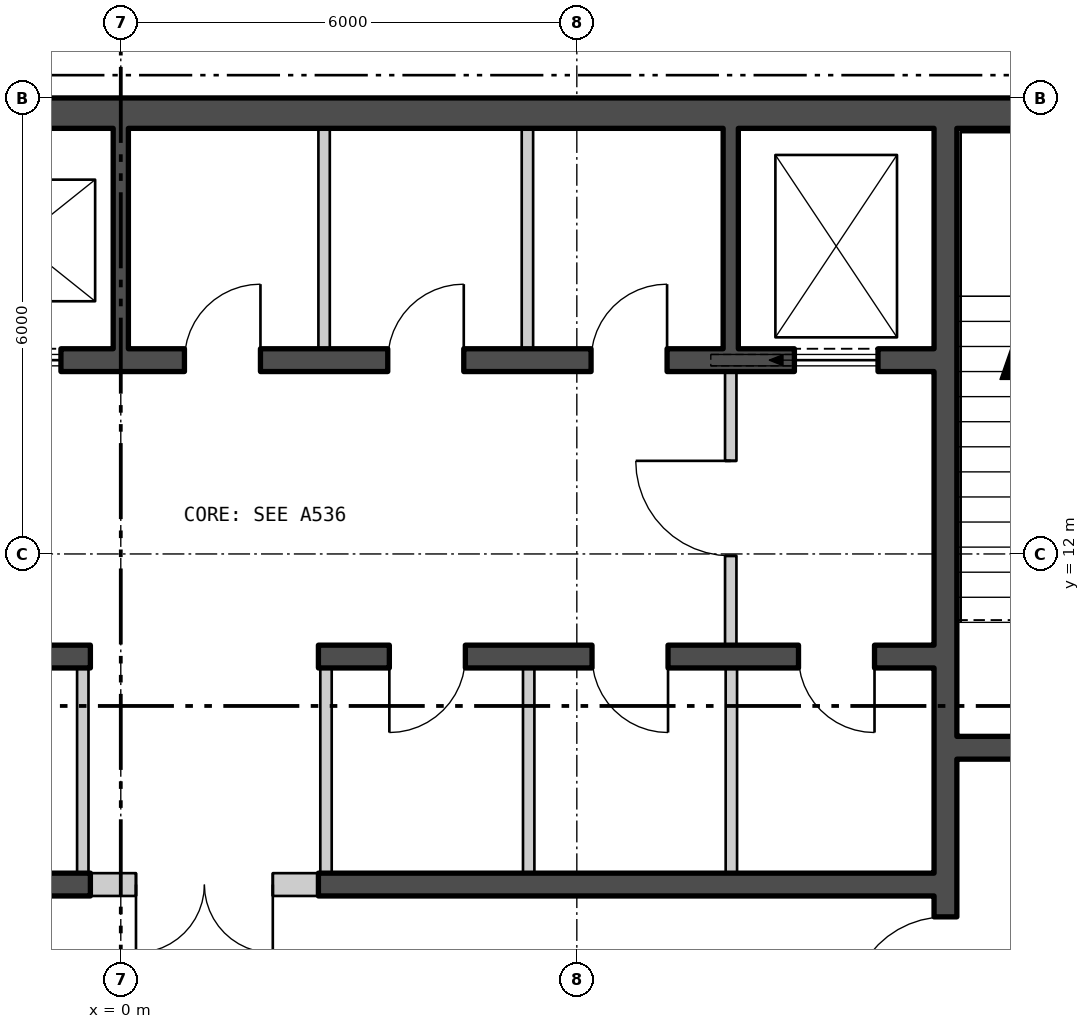
"""IFC4 building model, lengths in metres.
Left out: names, types, materials, properties, quantities, classifications, styles, units other than length and angle.
Written with IfcOpenShell. Run it as: python <this file> out.ifc"""

import sys

from ifc_helpers import new_model, si_unit, direction, frame, frame_2d, origin, place, context, subcontext, project, spatial, polyline, rectangle, outline, extrude, element, fill, save


model = new_model("IFC4")
c1 = context("Model", 3, precision=1e-05, world=origin(), true_north=direction((0.0, 1.0)))
c2 = subcontext(c1, "Body", "Model", "MODEL_VIEW")
j1 = project(units=[si_unit("LENGTHUNIT", "METRE"), si_unit("PLANEANGLEUNIT", "RADIAN")], contexts=[c1])
p1 = place(None, origin())
s1 = spatial("IfcSite", under=j1, at=p1, CompositionType="ELEMENT")
p2 = place(p1, origin())
s2 = spatial("IfcBuilding", under=s1, at=p2, CompositionType="ELEMENT")
p3 = place(p2, frame((0.0, 0.0, 304.2)))
s3 = spatial("IfcBuildingStorey", under=s2, at=p3, CompositionType="ELEMENT", Elevation=304.2)
p4 = place(p3, frame((2.23, -23.491, -0.18), z_axis=(0.0, 0.0, 1.0), x_axis=(0.500000141277, 0.866025322218, 0.0)))
e1 = element("IfcWall", 1, at=p4, inside=s3, PredefinedType="SOLIDWALL", context=c2, shape_type="SweptSolid", body=[
    extrude(outline(polyline([(-0.13, -0.225), (45.86, -0.225), (45.6, 0.225), (0.13, 0.225), (-0.13, -0.225)])), origin(), (0.0, 0.0, 1.0), 3.98),
])
p5 = place(p4, frame((1.424, 0.0, 1.08)))
e2 = element("IfcOpeningElement", 2, at=p5, cuts=e1, PredefinedType="OPENING", context=c2, shape_type="SweptSolid", body=[
    extrude(rectangle(XDim=2.4, YDim=2.3, at=frame_2d((1.2, 1.15))), frame((0.0, 0.235, 0.0), z_axis=(0.0, -1.0, 0.0), x_axis=(1.0, 0.0, 0.0)), (0.0, 0.0, 1.0), 0.47),
])
p6 = place(p4, frame((5.892, 0.0, 1.08)))
e3 = element("IfcOpeningElement", 3, at=p6, cuts=e1, PredefinedType="OPENING", context=c2, shape_type="SweptSolid", body=[
    extrude(rectangle(XDim=2.4, YDim=2.3, at=frame_2d((1.2, 1.15))), frame((0.0, 0.235, 0.0), z_axis=(0.0, -1.0, 0.0), x_axis=(1.0, 0.0, 0.0)), (0.0, 0.0, 1.0), 0.47),
])
p7 = place(p4, frame((10.399, 0.0, 1.08)))
e4 = element("IfcOpeningElement", 4, at=p7, cuts=e1, PredefinedType="OPENING", context=c2, shape_type="SweptSolid", body=[
    extrude(rectangle(XDim=2.4, YDim=2.3, at=frame_2d((1.2, 1.15))), frame((0.0, 0.235, 0.0), z_axis=(0.0, -1.0, 0.0), x_axis=(1.0, 0.0, 0.0)), (0.0, 0.0, 1.0), 0.47),
])
p8 = place(p4, frame((14.905, 0.0, 1.08)))
e5 = element("IfcOpeningElement", 5, at=p8, cuts=e1, PredefinedType="OPENING", context=c2, shape_type="SweptSolid", body=[
    extrude(rectangle(XDim=2.4, YDim=2.3, at=frame_2d((1.2, 1.15))), frame((0.0, 0.235, 0.0), z_axis=(0.0, -1.0, 0.0), x_axis=(1.0, 0.0, 0.0)), (0.0, 0.0, 1.0), 0.47),
])
p9 = place(p4, frame((19.412, 0.0, 1.08)))
e6 = element("IfcOpeningElement", 6, at=p9, cuts=e1, PredefinedType="OPENING", context=c2, shape_type="SweptSolid", body=[
    extrude(rectangle(XDim=2.4, YDim=2.3, at=frame_2d((1.2, 1.15))), frame((0.0, 0.235, 0.0), z_axis=(0.0, -1.0, 0.0), x_axis=(1.0, 0.0, 0.0)), (0.0, 0.0, 1.0), 0.47),
])
p10 = place(p4, frame((23.918, 0.0, 1.08)))
e7 = element("IfcOpeningElement", 7, at=p10, cuts=e1, PredefinedType="OPENING", context=c2, shape_type="SweptSolid", body=[
    extrude(rectangle(XDim=2.4, YDim=2.3, at=frame_2d((1.2, 1.15))), frame((0.0, 0.235, 0.0), z_axis=(0.0, -1.0, 0.0), x_axis=(1.0, 0.0, 0.0)), (0.0, 0.0, 1.0), 0.47),
])
p11 = place(p4, frame((28.425, 0.0, 1.08)))
e8 = element("IfcOpeningElement", 8, at=p11, cuts=e1, PredefinedType="OPENING", context=c2, shape_type="SweptSolid", body=[
    extrude(rectangle(XDim=2.4, YDim=2.3, at=frame_2d((1.2, 1.15))), frame((0.0, 0.235, 0.0), z_axis=(0.0, -1.0, 0.0), x_axis=(1.0, 0.0, 0.0)), (0.0, 0.0, 1.0), 0.47),
])
p12 = place(p4, frame((32.932, 0.0, 1.08)))
e9 = element("IfcOpeningElement", 9, at=p12, cuts=e1, PredefinedType="OPENING", context=c2, shape_type="SweptSolid", body=[
    extrude(rectangle(XDim=2.4, YDim=2.3, at=frame_2d((1.2, 1.15))), frame((0.0, 0.235, 0.0), z_axis=(0.0, -1.0, 0.0), x_axis=(1.0, 0.0, 0.0)), (0.0, 0.0, 1.0), 0.47),
])
p13 = place(p4, frame((37.438, 0.0, 1.08)))
e10 = element("IfcOpeningElement", 10, at=p13, cuts=e1, PredefinedType="OPENING", context=c2, shape_type="SweptSolid", body=[
    extrude(rectangle(XDim=2.4, YDim=2.3, at=frame_2d((1.2, 1.15))), frame((0.0, 0.235, 0.0), z_axis=(0.0, -1.0, 0.0), x_axis=(1.0, 0.0, 0.0)), (0.0, 0.0, 1.0), 0.47),
])
p14 = place(p4, frame((41.907, 0.0, 1.08)))
e11 = element("IfcOpeningElement", 11, at=p14, cuts=e1, PredefinedType="OPENING", context=c2, shape_type="SweptSolid", body=[
    extrude(rectangle(XDim=2.4, YDim=2.3, at=frame_2d((1.2, 1.15))), frame((0.0, 0.235, 0.0), z_axis=(0.0, -1.0, 0.0), x_axis=(1.0, 0.0, 0.0)), (0.0, 0.0, 1.0), 0.47),
])
p15 = place(p3, frame((-14.5, 17.8, 0.0), z_axis=(0.0, 0.0, 1.0), x_axis=(1.0, 0.0, 0.0)))
e12 = element("IfcWall", 12, at=p15, inside=s3, PredefinedType="SHEAR", context=c2, shape_type="SweptSolid", body=[
    extrude(rectangle(XDim=29.0, YDim=0.4, at=frame_2d((14.5, 0.0))), origin(), (0.0, 0.0, 1.0), 4.0),
])
p16 = place(p3, frame((10.85, 4.4, 0.0), z_axis=(0.0, 0.0, 1.0), x_axis=(0.0, 1.0, 0.0)))
e13 = element("IfcWall", 13, at=p16, inside=s3, PredefinedType="SHEAR", context=c2, shape_type="SweptSolid", body=[
    extrude(rectangle(XDim=13.2, YDim=0.3, at=frame_2d((6.6, 0.0))), origin(), (0.0, 0.0, 1.0), 4.0),
])
p17 = place(p16, frame((1.575, 0.0, 0.0)))
e14 = element("IfcOpeningElement", 14, at=p17, cuts=e13, PredefinedType="OPENING", context=c2, shape_type="SweptSolid", body=[
    extrude(rectangle(XDim=1.25, YDim=2.1, at=frame_2d((0.625, 1.05))), frame((0.0, 0.16, 0.0), z_axis=(0.0, -1.0, 0.0), x_axis=(1.0, 0.0, 0.0)), (0.0, 0.0, 1.0), 0.32),
])
p18 = place(p16, frame((0.4, 0.0, 0.0)))
e15 = element("IfcOpeningElement", 15, at=p18, cuts=e13, PredefinedType="OPENING", context=c2, shape_type="SweptSolid", body=[
    extrude(rectangle(XDim=0.9, YDim=2.1, at=frame_2d((0.45, 1.05))), frame((0.0, 0.16, 0.0), z_axis=(0.0, -1.0, 0.0), x_axis=(1.0, 0.0, 0.0)), (0.0, 0.0, 1.0), 0.32),
])
p19 = place(p3, frame((11.0, 9.45, 0.0), z_axis=(0.0, 0.0, 1.0), x_axis=(1.0, 0.0, 0.0)))
e16 = element("IfcWall", 16, at=p19, inside=s3, PredefinedType="SHEAR", context=c2, shape_type="SweptSolid", body=[
    extrude(rectangle(XDim=3.1, YDim=0.3, at=frame_2d((1.55, 0.0))), origin(), (0.0, 0.0, 1.0), 4.0),
])
p20 = place(p19, frame((0.95, 0.0, 0.0)))
e17 = element("IfcOpeningElement", 17, at=p20, cuts=e16, PredefinedType="OPENING", context=c2, shape_type="SweptSolid", body=[
    extrude(rectangle(XDim=1.2, YDim=2.1, at=frame_2d((0.6, 1.05))), frame((0.0, 0.16, 0.0), z_axis=(0.0, -1.0, 0.0), x_axis=(1.0, 0.0, 0.0)), (0.0, 0.0, 1.0), 0.32),
])
p21 = place(p3, frame((-10.7, 14.55, 0.0), z_axis=(0.0, 0.0, 1.0), x_axis=(1.0, 0.0, 0.0)))
e18 = element("IfcWall", 18, at=p21, inside=s3, PredefinedType="SHEAR", context=c2, shape_type="SweptSolid", body=[
    extrude(rectangle(XDim=21.4, YDim=0.3, at=frame_2d((10.7, 0.0))), origin(), (0.0, 0.0, 1.0), 4.0),
])
p22 = place(p21, frame((0.738, 0.0, 0.0)))
e19 = element("IfcOpeningElement", 19, at=p22, cuts=e18, PredefinedType="OPENING", context=c2, shape_type="SweptSolid", body=[
    extrude(rectangle(XDim=1.1, YDim=2.1, at=frame_2d((0.55, 1.05))), frame((0.0, 0.16, 0.0), z_axis=(0.0, -1.0, 0.0), x_axis=(1.0, 0.0, 0.0)), (0.0, 0.0, 1.0), 0.32),
])
p23 = place(p21, frame((3.462, 0.0, 0.0)))
e20 = element("IfcOpeningElement", 20, at=p23, cuts=e18, PredefinedType="OPENING", context=c2, shape_type="SweptSolid", body=[
    extrude(rectangle(XDim=1.1, YDim=2.1, at=frame_2d((0.55, 1.05))), frame((0.0, 0.16, 0.0), z_axis=(0.0, -1.0, 0.0), x_axis=(1.0, 0.0, 0.0)), (0.0, 0.0, 1.0), 0.32),
])
p24 = place(p21, frame((6.138, 0.0, 0.0)))
e21 = element("IfcOpeningElement", 21, at=p24, cuts=e18, PredefinedType="OPENING", context=c2, shape_type="SweptSolid", body=[
    extrude(rectangle(XDim=1.1, YDim=2.1, at=frame_2d((0.55, 1.05))), frame((0.0, 0.16, 0.0), z_axis=(0.0, -1.0, 0.0), x_axis=(1.0, 0.0, 0.0)), (0.0, 0.0, 1.0), 0.32),
])
p25 = place(p21, frame((8.812, 0.0, 0.0)))
e22 = element("IfcOpeningElement", 22, at=p25, cuts=e18, PredefinedType="OPENING", context=c2, shape_type="SweptSolid", body=[
    extrude(rectangle(XDim=1.1, YDim=2.1, at=frame_2d((0.55, 1.05))), frame((0.0, 0.16, 0.0), z_axis=(0.0, -1.0, 0.0), x_axis=(1.0, 0.0, 0.0)), (0.0, 0.0, 1.0), 0.32),
])
p26 = place(p21, frame((19.562, 0.0, 0.0)))
e23 = element("IfcOpeningElement", 23, at=p26, cuts=e18, PredefinedType="OPENING", context=c2, shape_type="SweptSolid", body=[
    extrude(rectangle(XDim=1.1, YDim=2.1, at=frame_2d((0.55, 1.05))), frame((0.0, 0.16, 0.0), z_axis=(0.0, -1.0, 0.0), x_axis=(1.0, 0.0, 0.0)), (0.0, 0.0, 1.0), 0.32),
])
p27 = place(p21, frame((11.537, 0.0, 0.0)))
e24 = element("IfcOpeningElement", 24, at=p27, cuts=e18, PredefinedType="OPENING", context=c2, shape_type="SweptSolid", body=[
    extrude(rectangle(XDim=1.0, YDim=2.1, at=frame_2d((0.5, 1.05))), frame((0.0, 0.16, 0.0), z_axis=(0.0, -1.0, 0.0), x_axis=(1.0, 0.0, 0.0)), (0.0, 0.0, 1.0), 0.32),
])
p28 = place(p21, frame((14.213, 0.0, 0.0)))
e25 = element("IfcOpeningElement", 25, at=p28, cuts=e18, PredefinedType="OPENING", context=c2, shape_type="SweptSolid", body=[
    extrude(rectangle(XDim=1.0, YDim=2.1, at=frame_2d((0.5, 1.05))), frame((0.0, 0.16, 0.0), z_axis=(0.0, -1.0, 0.0), x_axis=(1.0, 0.0, 0.0)), (0.0, 0.0, 1.0), 0.32),
])
p29 = place(p21, frame((16.887, 0.0, 0.0)))
e26 = element("IfcOpeningElement", 26, at=p29, cuts=e18, PredefinedType="OPENING", context=c2, shape_type="SweptSolid", body=[
    extrude(rectangle(XDim=1.0, YDim=2.1, at=frame_2d((0.5, 1.05))), frame((0.0, 0.16, 0.0), z_axis=(0.0, -1.0, 0.0), x_axis=(1.0, 0.0, 0.0)), (0.0, 0.0, 1.0), 0.32),
])
p30 = place(p3, frame((-10.7, 10.65, 0.0), z_axis=(0.0, 0.0, 1.0), x_axis=(1.0, 0.0, 0.0)))
e27 = element("IfcWall", 27, at=p30, inside=s3, PredefinedType="SHEAR", context=c2, shape_type="SweptSolid", body=[
    extrude(rectangle(XDim=10.3, YDim=0.3, at=frame_2d((5.15, 0.0))), origin(), (0.0, 0.0, 1.0), 4.0),
])
p31 = place(p30, frame((0.675, 0.0, 0.0)))
e28 = element("IfcOpeningElement", 28, at=p31, cuts=e27, PredefinedType="OPENING", context=c2, shape_type="SweptSolid", body=[
    extrude(rectangle(XDim=1.1, YDim=2.1, at=frame_2d((0.55, 1.05))), frame((0.0, 0.16, 0.0), z_axis=(0.0, -1.0, 0.0), x_axis=(1.0, 0.0, 0.0)), (0.0, 0.0, 1.0), 0.32),
])
p32 = place(p30, frame((3.275, 0.0, 0.0)))
e29 = element("IfcOpeningElement", 29, at=p32, cuts=e27, PredefinedType="OPENING", context=c2, shape_type="SweptSolid", body=[
    extrude(rectangle(XDim=1.1, YDim=2.1, at=frame_2d((0.55, 1.05))), frame((0.0, 0.16, 0.0), z_axis=(0.0, -1.0, 0.0), x_axis=(1.0, 0.0, 0.0)), (0.0, 0.0, 1.0), 0.32),
])
p33 = place(p30, frame((5.825, 0.0, 0.0)))
e30 = element("IfcOpeningElement", 30, at=p33, cuts=e27, PredefinedType="OPENING", context=c2, shape_type="SweptSolid", body=[
    extrude(rectangle(XDim=1.1, YDim=2.1, at=frame_2d((0.55, 1.05))), frame((0.0, 0.16, 0.0), z_axis=(0.0, -1.0, 0.0), x_axis=(1.0, 0.0, 0.0)), (0.0, 0.0, 1.0), 0.32),
])
p34 = place(p30, frame((8.425, 0.0, 0.0)))
e31 = element("IfcOpeningElement", 31, at=p34, cuts=e27, PredefinedType="OPENING", context=c2, shape_type="SweptSolid", body=[
    extrude(rectangle(XDim=1.0, YDim=2.1, at=frame_2d((0.5, 1.05))), frame((0.0, 0.16, 0.0), z_axis=(0.0, -1.0, 0.0), x_axis=(1.0, 0.0, 0.0)), (0.0, 0.0, 1.0), 0.32),
])
p35 = place(p3, frame((-10.7, 7.65, 0.0), z_axis=(0.0, 0.0, 1.0), x_axis=(1.0, 0.0, 0.0)))
e32 = element("IfcWall", 32, at=p35, inside=s3, PredefinedType="SHEAR", context=c2, shape_type="SweptSolid", body=[
    extrude(rectangle(XDim=10.3, YDim=0.3, at=frame_2d((5.15, 0.0))), origin(), (0.0, 0.0, 1.0), 4.0),
])
p36 = place(p3, frame((2.6, 10.65, 0.0), z_axis=(0.0, 0.0, 1.0), x_axis=(1.0, 0.0, 0.0)))
e33 = element("IfcWall", 33, at=p36, inside=s3, PredefinedType="SHEAR", context=c2, shape_type="SweptSolid", body=[
    extrude(rectangle(XDim=8.1, YDim=0.3, at=frame_2d((4.05, 0.0))), origin(), (0.0, 0.0, 1.0), 4.0),
])
p37 = place(p36, frame((0.933, 0.0, 0.0)))
e34 = element("IfcOpeningElement", 34, at=p37, cuts=e33, PredefinedType="OPENING", context=c2, shape_type="SweptSolid", body=[
    extrude(rectangle(XDim=1.0, YDim=2.1, at=frame_2d((0.5, 1.05))), frame((0.0, 0.16, 0.0), z_axis=(0.0, -1.0, 0.0), x_axis=(1.0, 0.0, 0.0)), (0.0, 0.0, 1.0), 0.32),
])
p38 = place(p36, frame((3.6, 0.0, 0.0)))
e35 = element("IfcOpeningElement", 35, at=p38, cuts=e33, PredefinedType="OPENING", context=c2, shape_type="SweptSolid", body=[
    extrude(rectangle(XDim=1.0, YDim=2.1, at=frame_2d((0.5, 1.05))), frame((0.0, 0.16, 0.0), z_axis=(0.0, -1.0, 0.0), x_axis=(1.0, 0.0, 0.0)), (0.0, 0.0, 1.0), 0.32),
])
p39 = place(p36, frame((6.317, 0.0, 0.0)))
e36 = element("IfcOpeningElement", 36, at=p39, cuts=e33, PredefinedType="OPENING", context=c2, shape_type="SweptSolid", body=[
    extrude(rectangle(XDim=1.0, YDim=2.1, at=frame_2d((0.5, 1.05))), frame((0.0, 0.16, 0.0), z_axis=(0.0, -1.0, 0.0), x_axis=(1.0, 0.0, 0.0)), (0.0, 0.0, 1.0), 0.32),
])
p40 = place(p3, frame((2.6, 7.65, 0.0), z_axis=(0.0, 0.0, 1.0), x_axis=(1.0, 0.0, 0.0)))
e37 = element("IfcWall", 37, at=p40, inside=s3, PredefinedType="SHEAR", context=c2, shape_type="SweptSolid", body=[
    extrude(rectangle(XDim=8.1, YDim=0.3, at=frame_2d((4.05, 0.0))), origin(), (0.0, 0.0, 1.0), 4.0),
])
p41 = place(p3, frame((0.0, 14.7, 0.0), z_axis=(0.0, 0.0, 1.0), x_axis=(0.0, 1.0, 0.0)))
e38 = element("IfcWall", 38, at=p41, inside=s3, PredefinedType="SHEAR", context=c2, shape_type="SweptSolid", body=[
    extrude(rectangle(XDim=2.9, YDim=0.2, at=frame_2d((1.45, 0.0))), origin(), (0.0, 0.0, 1.0), 4.0),
])
for number, where, z_axis, x_axis in (
    (39, (2.675, 14.7, 0.0), (0.0, 0.0, 1.0), (0.0, 1.0, 0.0)),
    (40, (5.35, 14.7, 0.0), (0.0, 0.0, 1.0), (0.0, 1.0, 0.0)),
):
    element("IfcWall", number, at=place(p3, frame(where, z_axis=z_axis, x_axis=x_axis)), inside=s3, PredefinedType="PARTITIONING", context=c2, shape_type="SweptSolid", body=[
        extrude(rectangle(XDim=2.9, YDim=0.15, at=frame_2d((1.45, 0.0))), origin(), (0.0, 0.0, 1.0), 4.0),
    ])
p42 = place(p3, frame((8.025, 14.7, 0.0), z_axis=(0.0, 0.0, 1.0), x_axis=(0.0, 1.0, 0.0)))
e41 = element("IfcWall", 41, at=p42, inside=s3, PredefinedType="SHEAR", context=c2, shape_type="SweptSolid", body=[
    extrude(rectangle(XDim=2.9, YDim=0.2, at=frame_2d((1.45, 0.0))), origin(), (0.0, 0.0, 1.0), 4.0),
])
for number, where, z_axis, x_axis in (
    (42, (-0.5, 7.8, 0.0), (0.0, 0.0, 1.0), (0.0, 1.0, 0.0)),
    (43, (2.7, 7.8, 0.0), (0.0, 0.0, 1.0), (0.0, 1.0, 0.0)),
    (44, (5.367, 7.8, 0.0), (0.0, 0.0, 1.0), (0.0, 1.0, 0.0)),
    (45, (8.033, 7.8, 0.0), (0.0, 0.0, 1.0), (0.0, 1.0, 0.0)),
):
    element("IfcWall", number, at=place(p3, frame(where, z_axis=z_axis, x_axis=x_axis)), inside=s3, PredefinedType="PARTITIONING", context=c2, shape_type="SweptSolid", body=[
        extrude(rectangle(XDim=2.7, YDim=0.15, at=frame_2d((1.35, 0.0))), origin(), (0.0, 0.0, 1.0), 4.0),
    ])
p43 = place(p3, frame((8.025, 10.8, 0.0), z_axis=(0.0, 0.0, 1.0), x_axis=(0.0, 1.0, 0.0)))
e46 = element("IfcWall", 46, at=p43, inside=s3, PredefinedType="PARTITIONING", context=c2, shape_type="SweptSolid", body=[
    extrude(rectangle(XDim=3.6, YDim=0.15, at=frame_2d((1.8, 0.0))), origin(), (0.0, 0.0, 1.0), 4.0),
])
p44 = place(p43, frame((1.175, 0.0, 0.0)))
e47 = element("IfcOpeningElement", 47, at=p44, cuts=e46, PredefinedType="OPENING", context=c2, shape_type="SweptSolid", body=[
    extrude(rectangle(XDim=1.25, YDim=2.1, at=frame_2d((0.625, 1.05))), frame((0.0, 0.085, 0.0), z_axis=(0.0, -1.0, 0.0), x_axis=(1.0, 0.0, 0.0)), (0.0, 0.0, 1.0), 0.17),
])
p45 = place(p3, frame((-0.4, 7.65, 0.0), z_axis=(0.0, 0.0, 1.0), x_axis=(1.0, 0.0, 0.0)))
e48 = element("IfcWall", 48, at=p45, inside=s3, PredefinedType="PARTITIONING", context=c2, shape_type="SweptSolid", body=[
    extrude(rectangle(XDim=3.0, YDim=0.3, at=frame_2d((1.5, 0.0))), origin(), (0.0, 0.0, 1.0), 4.0),
])
p46 = place(p45, frame((0.6, 0.0, 0.0)))
e49 = element("IfcOpeningElement", 49, at=p46, cuts=e48, PredefinedType="OPENING", context=c2, shape_type="SweptSolid", body=[
    extrude(rectangle(XDim=1.8, YDim=2.4, at=frame_2d((0.9, 1.2))), frame((0.0, 0.16, 0.0), z_axis=(0.0, -1.0, 0.0), x_axis=(1.0, 0.0, 0.0)), (0.0, 0.0, 1.0), 0.32),
])
p47 = place(p25, origin())
e50 = element("IfcDoor", 50, at=p47, inside=s3, OperationType="SLIDING_TO_LEFT", PredefinedType="DOOR", context=c2, shape_type="SweptSolid", body=[
    extrude(rectangle(XDim=1.1, YDim=2.1, at=frame_2d((0.55, 1.05))), frame((0.0, 0.025, 0.0), z_axis=(0.0, -1.0, 0.0), x_axis=(1.0, 0.0, 0.0)), (0.0, 0.0, 1.0), 0.05),
])
fill(e22, e50)
p48 = place(p26, origin())
e51 = element("IfcDoor", 51, at=p48, inside=s3, OperationType="SLIDING_TO_LEFT", PredefinedType="DOOR", context=c2, shape_type="SweptSolid", body=[
    extrude(rectangle(XDim=1.1, YDim=2.1, at=frame_2d((0.55, 1.05))), frame((0.0, 0.025, 0.0), z_axis=(0.0, -1.0, 0.0), x_axis=(1.0, 0.0, 0.0)), (0.0, 0.0, 1.0), 0.05),
])
fill(e23, e51)
p49 = place(p27, origin())
e52 = element("IfcDoor", 52, at=p49, inside=s3, OperationType="SINGLE_SWING_LEFT", PredefinedType="DOOR", context=c2, shape_type="SweptSolid", body=[
    extrude(rectangle(XDim=1.0, YDim=2.1, at=frame_2d((0.5, 1.05))), frame((0.0, 0.025, 0.0), z_axis=(0.0, -1.0, 0.0), x_axis=(1.0, 0.0, 0.0)), (0.0, 0.0, 1.0), 0.05),
])
fill(e24, e52)
p50 = place(p28, origin())
e53 = element("IfcDoor", 53, at=p50, inside=s3, OperationType="SINGLE_SWING_LEFT", PredefinedType="DOOR", context=c2, shape_type="SweptSolid", body=[
    extrude(rectangle(XDim=1.0, YDim=2.1, at=frame_2d((0.5, 1.05))), frame((0.0, 0.025, 0.0), z_axis=(0.0, -1.0, 0.0), x_axis=(1.0, 0.0, 0.0)), (0.0, 0.0, 1.0), 0.05),
])
fill(e25, e53)
p51 = place(p29, origin())
e54 = element("IfcDoor", 54, at=p51, inside=s3, OperationType="SINGLE_SWING_LEFT", PredefinedType="DOOR", context=c2, shape_type="SweptSolid", body=[
    extrude(rectangle(XDim=1.0, YDim=2.1, at=frame_2d((0.5, 1.05))), frame((0.0, 0.025, 0.0), z_axis=(0.0, -1.0, 0.0), x_axis=(1.0, 0.0, 0.0)), (0.0, 0.0, 1.0), 0.05),
])
fill(e26, e54)
p52 = place(p37, origin())
e55 = element("IfcDoor", 55, at=p52, inside=s3, OperationType="SINGLE_SWING_LEFT", PredefinedType="DOOR", context=c2, shape_type="SweptSolid", body=[
    extrude(rectangle(XDim=1.0, YDim=2.1, at=frame_2d((0.5, 1.05))), frame((0.0, 0.025, 0.0), z_axis=(0.0, -1.0, 0.0), x_axis=(1.0, 0.0, 0.0)), (0.0, 0.0, 1.0), 0.05),
])
fill(e34, e55)
p53 = place(p38, origin())
e56 = element("IfcDoor", 56, at=p53, inside=s3, OperationType="SINGLE_SWING_RIGHT", PredefinedType="DOOR", context=c2, shape_type="SweptSolid", body=[
    extrude(rectangle(XDim=1.0, YDim=2.1, at=frame_2d((0.5, 1.05))), frame((0.0, 0.025, 0.0), z_axis=(0.0, -1.0, 0.0), x_axis=(1.0, 0.0, 0.0)), (0.0, 0.0, 1.0), 0.05),
])
fill(e35, e56)
p54 = place(p39, origin())
e57 = element("IfcDoor", 57, at=p54, inside=s3, OperationType="SINGLE_SWING_RIGHT", PredefinedType="DOOR", context=c2, shape_type="SweptSolid", body=[
    extrude(rectangle(XDim=1.0, YDim=2.1, at=frame_2d((0.5, 1.05))), frame((0.0, 0.025, 0.0), z_axis=(0.0, -1.0, 0.0), x_axis=(1.0, 0.0, 0.0)), (0.0, 0.0, 1.0), 0.05),
])
fill(e36, e57)
p55 = place(p44, origin())
e58 = element("IfcDoor", 58, at=p55, inside=s3, OperationType="SINGLE_SWING_LEFT", PredefinedType="DOOR", context=c2, shape_type="SweptSolid", body=[
    extrude(rectangle(XDim=1.25, YDim=2.1, at=frame_2d((0.625, 1.05))), frame((0.0, 0.025, 0.0), z_axis=(0.0, -1.0, 0.0), x_axis=(1.0, 0.0, 0.0)), (0.0, 0.0, 1.0), 0.05),
])
fill(e47, e58)
p56 = place(p17, origin())
e59 = element("IfcDoor", 59, at=p56, inside=s3, OperationType="SINGLE_SWING_RIGHT", PredefinedType="DOOR", context=c2, shape_type="SweptSolid", body=[
    extrude(rectangle(XDim=1.25, YDim=2.1, at=frame_2d((0.625, 1.05))), frame((0.0, 0.025, 0.0), z_axis=(0.0, -1.0, 0.0), x_axis=(1.0, 0.0, 0.0)), (0.0, 0.0, 1.0), 0.05),
])
fill(e14, e59)
p57 = place(p46, origin())
e60 = element("IfcDoor", 60, at=p57, inside=s3, OperationType="DOUBLE_DOOR_SINGLE_SWING", PredefinedType="DOOR", context=c2, shape_type="SweptSolid", body=[
    extrude(rectangle(XDim=1.8, YDim=2.4, at=frame_2d((0.9, 1.2))), frame((0.0, 0.025, 0.0), z_axis=(0.0, -1.0, 0.0), x_axis=(1.0, 0.0, 0.0)), (0.0, 0.0, 1.0), 0.05),
])
fill(e49, e60)
save(model, sys.argv[1])
